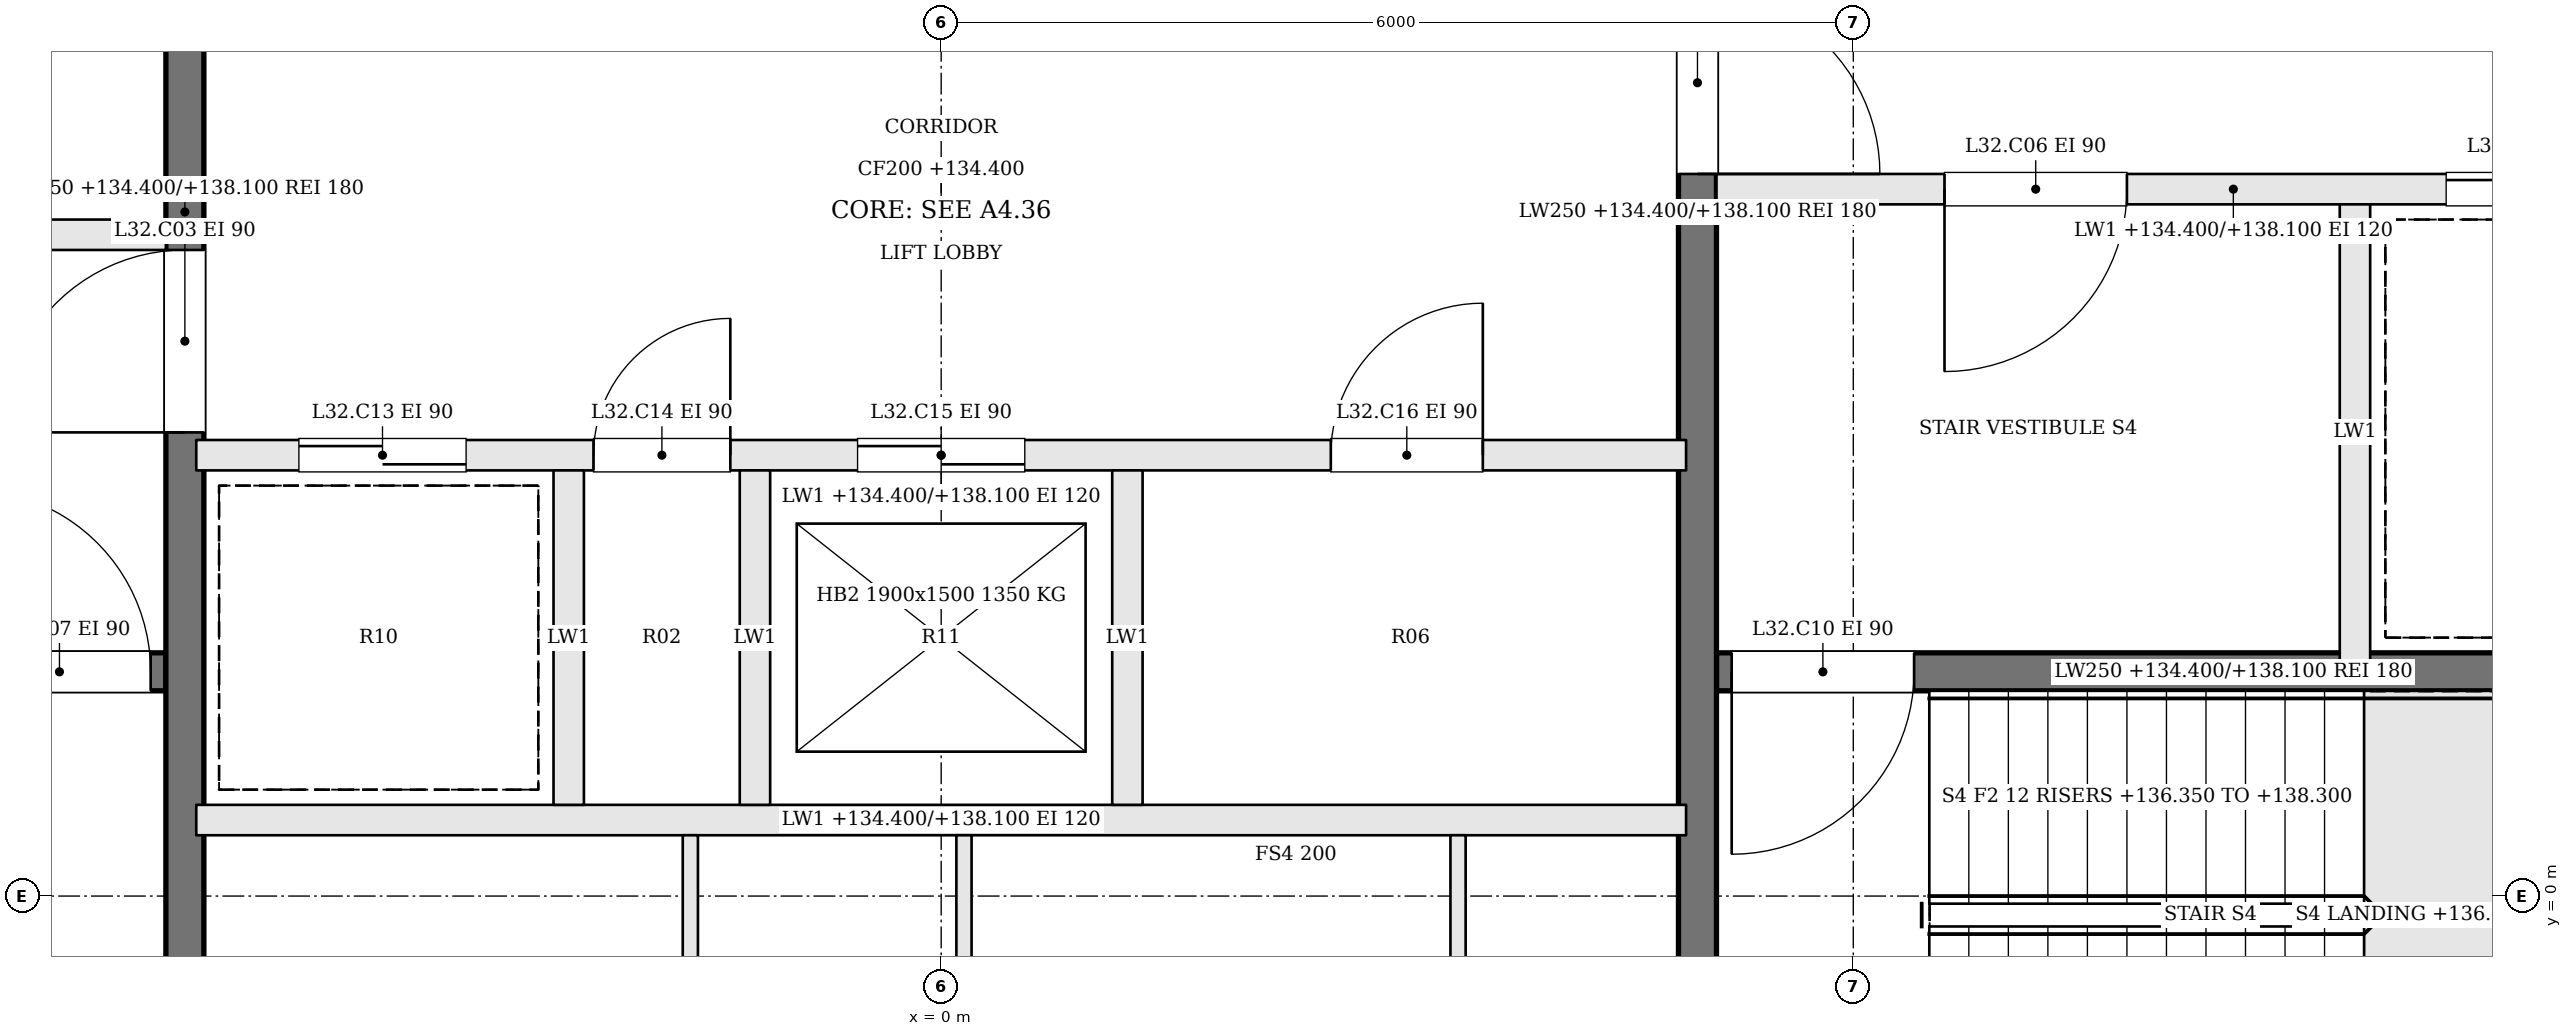
"""IFC4 building model, lengths in metres.
Left out: names, types, materials, properties, quantities, classifications, styles, units other than length and angle.
Written with IfcOpenShell. Run it as: python <this file> out.ifc"""

import sys

from ifc_helpers import new_model, si_unit, direction, frame, frame_2d, origin, place, context, subcontext, project, spatial, rectangle, extrude, element, fill, save


model = new_model("IFC4")
c1 = context("Model", 3, precision=1e-05, world=origin(), true_north=direction((0.0, 1.0)))
c2 = subcontext(c1, "Body", "Model", "MODEL_VIEW")
j1 = project(units=[si_unit("LENGTHUNIT", "METRE"), si_unit("PLANEANGLEUNIT", "RADIAN")], contexts=[c1])
p1 = place(None, origin())
s1 = spatial("IfcSite", under=j1, at=p1, CompositionType="ELEMENT")
p2 = place(p1, origin())
s2 = spatial("IfcBuilding", under=s1, at=p2, CompositionType="ELEMENT")
p3 = place(p2, frame((0.0, 0.0, 134.4)))
s3 = spatial("IfcBuildingStorey", under=s2, at=p3, CompositionType="ELEMENT", Elevation=134.4)
p4 = place(p3, frame((-11.9, 1.475, 0.0), z_axis=(0.0, 0.0, 1.0), x_axis=(1.0, 0.0, 0.0)))
e1 = element("IfcWall", 1, at=p4, inside=s3, PredefinedType="SOLIDWALL", context=c2, shape_type="SweptSolid", body=[
    extrude(rectangle(XDim=6.8, YDim=0.25, at=frame_2d((3.4, 0.0))), origin(), (0.0, 0.0, 1.0), 3.7),
])
p5 = place(p4, frame((5.5, 0.0, 0.0)))
e2 = element("IfcOpeningElement", 2, at=p5, cuts=e1, PredefinedType="OPENING", context=c2, shape_type="SweptSolid", body=[
    extrude(rectangle(XDim=1.2, YDim=2.1, at=frame_2d((0.6, 1.05))), frame((0.0, 0.135, 0.0), z_axis=(0.0, -1.0, 0.0), x_axis=(1.0, 0.0, 0.0)), (0.0, 0.0, 1.0), 0.27),
])
p6 = place(p3, frame((-11.9, 4.35, 0.0), z_axis=(0.0, 0.0, 1.0), x_axis=(1.0, 0.0, 0.0)))
e3 = element("IfcWall", 3, at=p6, inside=s3, PredefinedType="SOLIDWALL", context=c2, shape_type="SweptSolid", body=[
    extrude(rectangle(XDim=6.8, YDim=0.2, at=frame_2d((3.4, 0.0))), origin(), (0.0, 0.0, 1.0), 3.7),
])
p7 = place(p6, frame((4.1, 0.0, 0.0)))
e4 = element("IfcOpeningElement", 4, at=p7, cuts=e3, PredefinedType="OPENING", context=c2, shape_type="SweptSolid", body=[
    extrude(rectangle(XDim=1.2, YDim=2.1, at=frame_2d((0.6, 1.05))), frame((0.0, 0.11, 0.0), z_axis=(0.0, -1.0, 0.0), x_axis=(1.0, 0.0, 0.0)), (0.0, 0.0, 1.0), 0.22),
])
p8 = place(p6, frame((0.8, 0.0, 0.0)))
e5 = element("IfcOpeningElement", 5, at=p8, cuts=e3, PredefinedType="OPENING", context=c2, shape_type="SweptSolid", body=[
    extrude(rectangle(XDim=1.2, YDim=2.1, at=frame_2d((0.6, 1.05))), frame((0.0, 0.11, 0.0), z_axis=(0.0, -1.0, 0.0), x_axis=(1.0, 0.0, 0.0)), (0.0, 0.0, 1.0), 0.22),
])
p9 = place(p3, frame((11.9, 4.65, 0.0), z_axis=(0.0, 0.0, 1.0), x_axis=(-1.0, 0.0, 0.0)))
e6 = element("IfcWall", 6, at=p9, inside=s3, PredefinedType="SOLIDWALL", context=c2, shape_type="SweptSolid", body=[
    extrude(rectangle(XDim=6.8, YDim=0.2, at=frame_2d((3.4, 0.0))), origin(), (0.0, 0.0, 1.0), 3.7),
])
p10 = place(p9, frame((4.1, 0.0, 0.0)))
e7 = element("IfcOpeningElement", 7, at=p10, cuts=e6, PredefinedType="OPENING", context=c2, shape_type="SweptSolid", body=[
    extrude(rectangle(XDim=1.2, YDim=2.1, at=frame_2d((0.6, 1.05))), frame((0.0, 0.11, 0.0), z_axis=(0.0, -1.0, 0.0), x_axis=(1.0, 0.0, 0.0)), (0.0, 0.0, 1.0), 0.22),
])
p11 = place(p9, frame((0.8, 0.0, 0.0)))
e8 = element("IfcOpeningElement", 8, at=p11, cuts=e6, PredefinedType="OPENING", context=c2, shape_type="SweptSolid", body=[
    extrude(rectangle(XDim=1.2, YDim=2.1, at=frame_2d((0.6, 1.05))), frame((0.0, 0.11, 0.0), z_axis=(0.0, -1.0, 0.0), x_axis=(1.0, 0.0, 0.0)), (0.0, 0.0, 1.0), 0.22),
])
p12 = place(p3, frame((11.9, 1.475, 0.0), z_axis=(0.0, 0.0, 1.0), x_axis=(-1.0, 0.0, 0.0)))
e9 = element("IfcWall", 9, at=p12, inside=s3, PredefinedType="SOLIDWALL", context=c2, shape_type="SweptSolid", body=[
    extrude(rectangle(XDim=6.8, YDim=0.25, at=frame_2d((3.4, 0.0))), origin(), (0.0, 0.0, 1.0), 3.7),
])
p13 = place(p12, frame((5.5, 0.0, 0.0)))
e10 = element("IfcOpeningElement", 10, at=p13, cuts=e9, PredefinedType="OPENING", context=c2, shape_type="SweptSolid", body=[
    extrude(rectangle(XDim=1.2, YDim=2.1, at=frame_2d((0.6, 1.05))), frame((0.0, 0.135, 0.0), z_axis=(0.0, -1.0, 0.0), x_axis=(1.0, 0.0, 0.0)), (0.0, 0.0, 1.0), 0.27),
])
p14 = place(p3, frame((9.3, 4.55, 0.0), z_axis=(0.0, 0.0, 1.0), x_axis=(0.0, -1.0, 0.0)))
e11 = element("IfcWall", 11, at=p14, inside=s3, PredefinedType="SOLIDWALL", context=c2, shape_type="SweptSolid", body=[
    extrude(rectangle(XDim=3.0, YDim=0.2, at=frame_2d((1.5, 0.0))), origin(), (0.0, 0.0, 1.0), 3.7),
])
p15 = place(p3, frame((-4.975, -1.9, 0.0), z_axis=(0.0, 0.0, 1.0), x_axis=(0.0, 1.0, 0.0)))
e12 = element("IfcWall", 12, at=p15, inside=s3, PredefinedType="SOLIDWALL", context=c2, shape_type="SweptSolid", body=[
    extrude(rectangle(XDim=12.8, YDim=0.25, at=frame_2d((6.4, 0.0))), origin(), (0.0, 0.0, 1.0), 3.7),
])
p16 = place(p15, frame((4.95, 0.0, 0.0)))
e13 = element("IfcOpeningElement", 13, at=p16, cuts=e12, PredefinedType="OPENING", context=c2, shape_type="SweptSolid", body=[
    extrude(rectangle(XDim=1.2, YDim=2.1, at=frame_2d((0.6, 1.05))), frame((0.0, 0.135, 0.0), z_axis=(0.0, -1.0, 0.0), x_axis=(1.0, 0.0, 0.0)), (0.0, 0.0, 1.0), 0.27),
])
p17 = place(p3, frame((4.975, 10.9, 0.0), z_axis=(0.0, 0.0, 1.0), x_axis=(0.0, -1.0, 0.0)))
e14 = element("IfcWall", 14, at=p17, inside=s3, PredefinedType="SOLIDWALL", context=c2, shape_type="SweptSolid", body=[
    extrude(rectangle(XDim=12.8, YDim=0.25, at=frame_2d((6.4, 0.0))), origin(), (0.0, 0.0, 1.0), 3.7),
])
p18 = place(p17, frame((4.95, 0.0, 0.0)))
e15 = element("IfcOpeningElement", 15, at=p18, cuts=e14, PredefinedType="OPENING", context=c2, shape_type="SweptSolid", body=[
    extrude(rectangle(XDim=1.2, YDim=2.1, at=frame_2d((0.6, 1.05))), frame((0.0, 0.135, 0.0), z_axis=(0.0, -1.0, 0.0), x_axis=(1.0, 0.0, 0.0)), (0.0, 0.0, 1.0), 0.27),
])
p19 = place(p3, frame((-4.9, 0.5, 0.0), z_axis=(0.0, 0.0, 1.0), x_axis=(1.0, 0.0, 0.0)))
e16 = element("IfcWall", 16, at=p19, inside=s3, PredefinedType="SOLIDWALL", context=c2, shape_type="SweptSolid", body=[
    extrude(rectangle(XDim=9.8, YDim=0.2, at=frame_2d((4.9, 0.0))), origin(), (0.0, 0.0, 1.0), 3.7),
])
p20 = place(p3, frame((-4.9, 2.9, 0.0), z_axis=(0.0, 0.0, 1.0), x_axis=(1.0, 0.0, 0.0)))
e17 = element("IfcWall", 17, at=p20, inside=s3, PredefinedType="SOLIDWALL", context=c2, shape_type="SweptSolid", body=[
    extrude(rectangle(XDim=9.8, YDim=0.2, at=frame_2d((4.9, 0.0))), origin(), (0.0, 0.0, 1.0), 3.7),
])
p21 = place(p20, frame((0.675, 0.0, 0.0)))
e18 = element("IfcOpeningElement", 18, at=p21, cuts=e17, PredefinedType="OPENING", context=c2, shape_type="SweptSolid", body=[
    extrude(rectangle(XDim=1.1, YDim=2.1, at=frame_2d((0.55, 1.05))), frame((0.0, 0.11, 0.0), z_axis=(0.0, -1.0, 0.0), x_axis=(1.0, 0.0, 0.0)), (0.0, 0.0, 1.0), 0.22),
])
p22 = place(p20, frame((2.613, 0.0, 0.0)))
e19 = element("IfcOpeningElement", 19, at=p22, cuts=e17, PredefinedType="OPENING", context=c2, shape_type="SweptSolid", body=[
    extrude(rectangle(XDim=0.9, YDim=2.1, at=frame_2d((0.45, 1.05))), frame((0.0, 0.11, 0.0), z_axis=(0.0, -1.0, 0.0), x_axis=(1.0, 0.0, 0.0)), (0.0, 0.0, 1.0), 0.22),
])
p23 = place(p20, frame((4.35, 0.0, 0.0)))
e20 = element("IfcOpeningElement", 20, at=p23, cuts=e17, PredefinedType="OPENING", context=c2, shape_type="SweptSolid", body=[
    extrude(rectangle(XDim=1.1, YDim=2.1, at=frame_2d((0.55, 1.05))), frame((0.0, 0.11, 0.0), z_axis=(0.0, -1.0, 0.0), x_axis=(1.0, 0.0, 0.0)), (0.0, 0.0, 1.0), 0.22),
])
p24 = place(p20, frame((7.463, 0.0, 0.0)))
e21 = element("IfcOpeningElement", 21, at=p24, cuts=e17, PredefinedType="OPENING", context=c2, shape_type="SweptSolid", body=[
    extrude(rectangle(XDim=1.0, YDim=2.1, at=frame_2d((0.5, 1.05))), frame((0.0, 0.11, 0.0), z_axis=(0.0, -1.0, 0.0), x_axis=(1.0, 0.0, 0.0)), (0.0, 0.0, 1.0), 0.22),
])
for number, where, z_axis, x_axis in (
    (22, (-2.45, 0.6, 0.0), (0.0, 0.0, 1.0), (0.0, 1.0, 0.0)),
    (23, (-1.225, 0.6, 0.0), (0.0, 0.0, 1.0), (0.0, 1.0, 0.0)),
    (24, (1.225, 0.6, 0.0), (0.0, 0.0, 1.0), (0.0, 1.0, 0.0)),
):
    element("IfcWall", number, at=place(p3, frame(where, z_axis=z_axis, x_axis=x_axis)), inside=s3, PredefinedType="SOLIDWALL", context=c2, shape_type="SweptSolid", body=[
        extrude(rectangle(XDim=2.2, YDim=0.2, at=frame_2d((1.1, 0.0))), origin(), (0.0, 0.0, 1.0), 3.7),
    ])
for number, where, z_axis, x_axis in (
    (25, (-1.65, -1.9, 0.0), (0.0, 0.0, 1.0), (0.0, 1.0, 0.0)),
    (26, (0.15, -1.9, 0.0), (0.0, 0.0, 1.0), (0.0, 1.0, 0.0)),
    (27, (3.4, -1.9, 0.0), (0.0, 0.0, 1.0), (0.0, 1.0, 0.0)),
):
    element("IfcWall", number, at=place(p3, frame(where, z_axis=z_axis, x_axis=x_axis)), inside=s3, PredefinedType="PARTITIONING", context=c2, shape_type="SweptSolid", body=[
        extrude(rectangle(XDim=2.3, YDim=0.1, at=frame_2d((1.15, 0.0))), origin(), (0.0, 0.0, 1.0), 3.7),
    ])
p25 = place(p16, origin())
e28 = element("IfcDoor", 28, at=p25, inside=s3, OperationType="SINGLE_SWING_LEFT", PredefinedType="DOOR", context=c2, shape_type="SweptSolid", body=[
    extrude(rectangle(XDim=1.2, YDim=2.1, at=frame_2d((0.6, 1.05))), frame((0.0, 0.025, 0.0), z_axis=(0.0, -1.0, 0.0), x_axis=(1.0, 0.0, 0.0)), (0.0, 0.0, 1.0), 0.05),
])
fill(e13, e28)
p26 = place(p18, origin())
e29 = element("IfcDoor", 29, at=p26, inside=s3, OperationType="SINGLE_SWING_RIGHT", PredefinedType="DOOR", context=c2, shape_type="SweptSolid", body=[
    extrude(rectangle(XDim=1.2, YDim=2.1, at=frame_2d((0.6, 1.05))), frame((0.0, 0.025, 0.0), z_axis=(0.0, -1.0, 0.0), x_axis=(1.0, 0.0, 0.0)), (0.0, 0.0, 1.0), 0.05),
])
fill(e15, e29)
p27 = place(p10, origin())
e30 = element("IfcDoor", 30, at=p27, inside=s3, OperationType="SINGLE_SWING_RIGHT", PredefinedType="DOOR", context=c2, shape_type="SweptSolid", body=[
    extrude(rectangle(XDim=1.2, YDim=2.1, at=frame_2d((0.6, 1.05))), frame((0.0, 0.025, 0.0), z_axis=(0.0, -1.0, 0.0), x_axis=(1.0, 0.0, 0.0)), (0.0, 0.0, 1.0), 0.05),
])
fill(e7, e30)
p28 = place(p5, origin())
e31 = element("IfcDoor", 31, at=p28, inside=s3, OperationType="SINGLE_SWING_LEFT", PredefinedType="DOOR", context=c2, shape_type="SweptSolid", body=[
    extrude(rectangle(XDim=1.2, YDim=2.1, at=frame_2d((0.6, 1.05))), frame((0.0, 0.025, 0.0), z_axis=(0.0, -1.0, 0.0), x_axis=(1.0, 0.0, 0.0)), (0.0, 0.0, 1.0), 0.05),
])
fill(e2, e31)
p29 = place(p13, origin())
e32 = element("IfcDoor", 32, at=p29, inside=s3, OperationType="SINGLE_SWING_RIGHT", PredefinedType="DOOR", context=c2, shape_type="SweptSolid", body=[
    extrude(rectangle(XDim=1.2, YDim=2.1, at=frame_2d((0.6, 1.05))), frame((0.0, 0.025, 0.0), z_axis=(0.0, -1.0, 0.0), x_axis=(1.0, 0.0, 0.0)), (0.0, 0.0, 1.0), 0.05),
])
fill(e10, e32)
p30 = place(p11, origin())
e33 = element("IfcDoor", 33, at=p30, inside=s3, OperationType="SLIDING_TO_RIGHT", PredefinedType="DOOR", context=c2, shape_type="SweptSolid", body=[
    extrude(rectangle(XDim=1.2, YDim=2.1, at=frame_2d((0.6, 1.05))), frame((0.0, 0.025, 0.0), z_axis=(0.0, -1.0, 0.0), x_axis=(1.0, 0.0, 0.0)), (0.0, 0.0, 1.0), 0.05),
])
fill(e8, e33)
p31 = place(p21, origin())
e34 = element("IfcDoor", 34, at=p31, inside=s3, OperationType="SLIDING_TO_RIGHT", PredefinedType="DOOR", context=c2, shape_type="SweptSolid", body=[
    extrude(rectangle(XDim=1.1, YDim=2.1, at=frame_2d((0.55, 1.05))), frame((0.0, 0.025, 0.0), z_axis=(0.0, -1.0, 0.0), x_axis=(1.0, 0.0, 0.0)), (0.0, 0.0, 1.0), 0.05),
])
fill(e18, e34)
p32 = place(p22, origin())
e35 = element("IfcDoor", 35, at=p32, inside=s3, OperationType="SINGLE_SWING_RIGHT", PredefinedType="DOOR", context=c2, shape_type="SweptSolid", body=[
    extrude(rectangle(XDim=0.9, YDim=2.1, at=frame_2d((0.45, 1.05))), frame((0.0, 0.025, 0.0), z_axis=(0.0, -1.0, 0.0), x_axis=(1.0, 0.0, 0.0)), (0.0, 0.0, 1.0), 0.05),
])
fill(e19, e35)
p33 = place(p23, origin())
e36 = element("IfcDoor", 36, at=p33, inside=s3, OperationType="SLIDING_TO_LEFT", PredefinedType="DOOR", context=c2, shape_type="SweptSolid", body=[
    extrude(rectangle(XDim=1.1, YDim=2.1, at=frame_2d((0.55, 1.05))), frame((0.0, 0.025, 0.0), z_axis=(0.0, -1.0, 0.0), x_axis=(1.0, 0.0, 0.0)), (0.0, 0.0, 1.0), 0.05),
])
fill(e20, e36)
p34 = place(p24, origin())
e37 = element("IfcDoor", 37, at=p34, inside=s3, OperationType="SINGLE_SWING_RIGHT", PredefinedType="DOOR", context=c2, shape_type="SweptSolid", body=[
    extrude(rectangle(XDim=1.0, YDim=2.1, at=frame_2d((0.5, 1.05))), frame((0.0, 0.025, 0.0), z_axis=(0.0, -1.0, 0.0), x_axis=(1.0, 0.0, 0.0)), (0.0, 0.0, 1.0), 0.05),
])
fill(e21, e37)
save(model, sys.argv[1])
